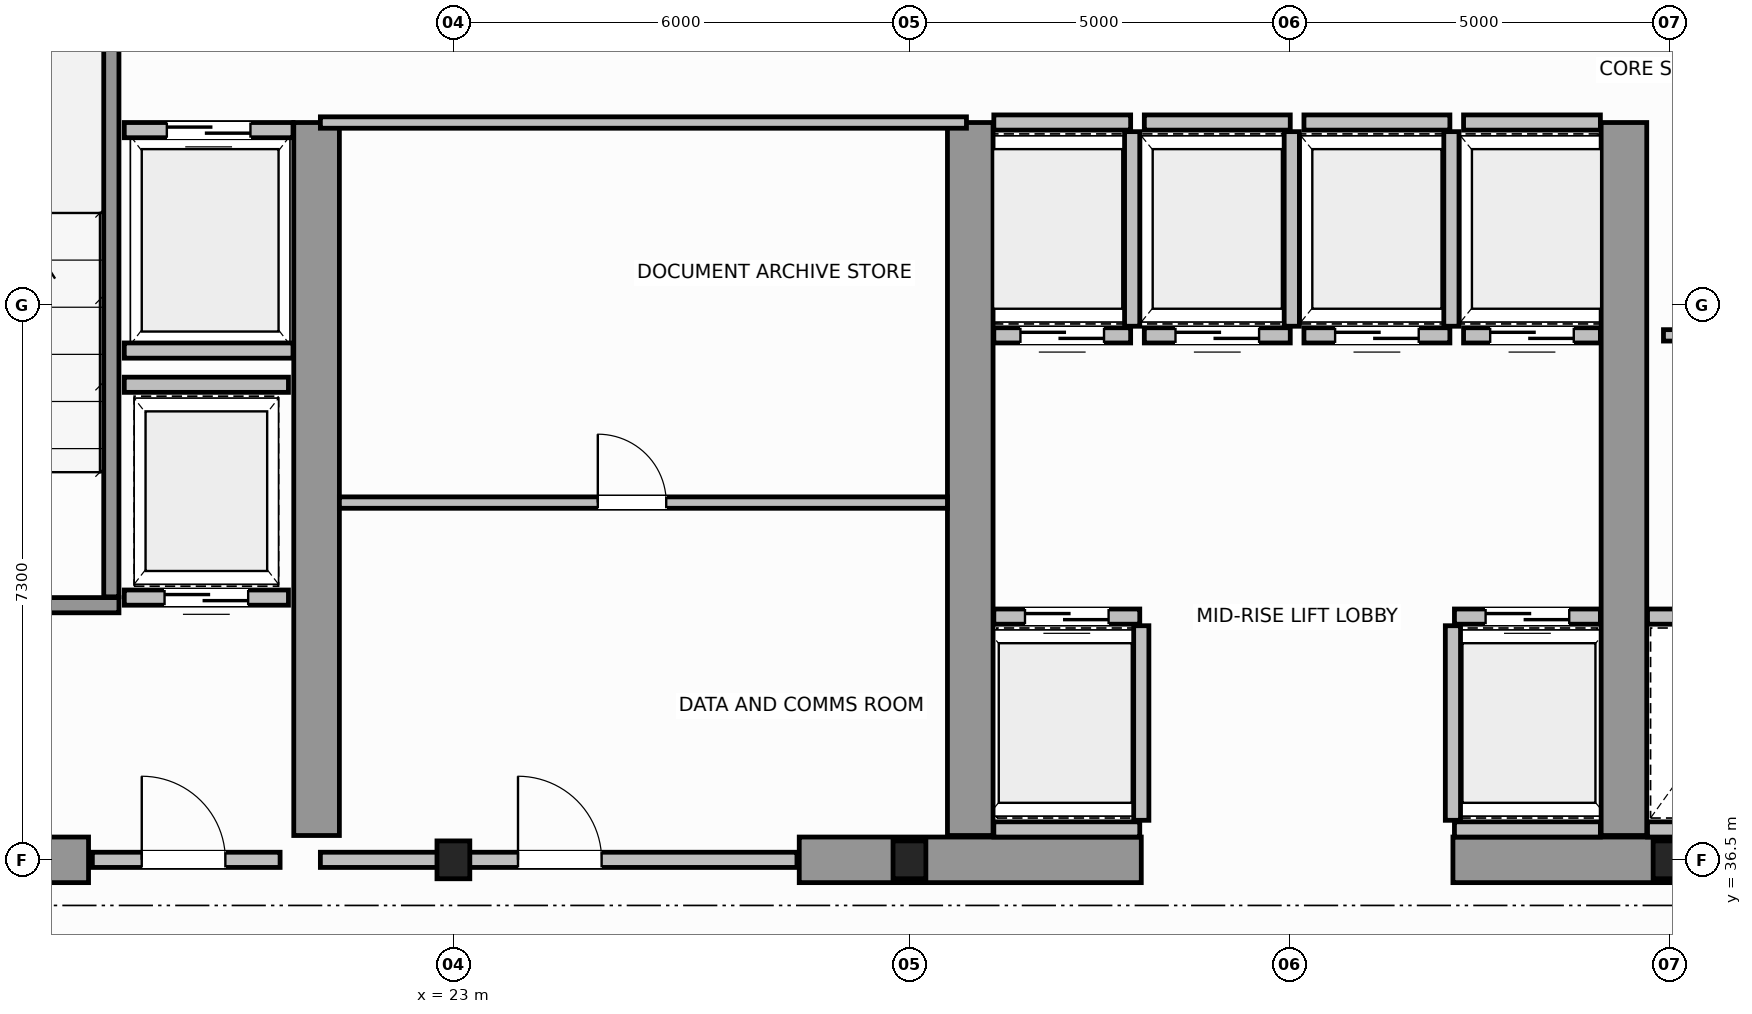
"""IFC4 building model, lengths in metres.
Left out: names, types, materials, properties, quantities, classifications, styles, units other than length and angle.
Written with IfcOpenShell. Run it as: python <this file> out.ifc"""

import sys

from ifc_helpers import new_model, si_unit, direction, frame, frame_2d, origin, origin_2d, place, context, subcontext, project, spatial, rectangle, i_section, extrude, source, transform, mapped, element, fill, save


model = new_model("IFC4")
c1 = context("Model", 3, precision=1e-05, world=origin(), true_north=direction((0.0, 1.0)))
c2 = subcontext(c1, "Body", "Model", "MODEL_VIEW")
j1 = project(units=[si_unit("LENGTHUNIT", "METRE"), si_unit("PLANEANGLEUNIT", "RADIAN")], contexts=[c1])
p1 = place(None, origin())
s1 = spatial("IfcSite", under=j1, at=p1, CompositionType="ELEMENT")
p2 = place(p1, origin())
s2 = spatial("IfcBuilding", under=s1, at=p2, CompositionType="ELEMENT")
p3 = place(p2, frame((0.0, 0.0, 176.6)))
s3 = spatial("IfcBuildingStorey", under=s2, at=p3, CompositionType="ELEMENT", Elevation=176.6)
m1 = source(origin(), c2, "Body", "SweptSolid", [
    extrude(i_section(OverallWidth=0.432, OverallDepth=0.498, WebThickness=0.055, FlangeThickness=0.068, FilletRadius=0.015, at=origin_2d()), origin(), (0.0, 0.0, 1.0), 3.8),
])
for number, where, z_axis, x_axis in (
    (1, (23.0, 36.5, 0.0), (0.0, 0.0, 1.0), (1.0, 0.0, 0.0)),
    (2, (29.0, 36.5, 0.0), (0.0, 0.0, 1.0), (1.0, 0.0, 0.0)),
    (3, (39.0, 36.5, 0.0), (0.0, 0.0, 1.0), (1.0, 0.0, 0.0)),
):
    element("IfcColumn", number, at=place(p3, frame(where, z_axis=z_axis, x_axis=x_axis)), inside=s3, PredefinedType="COLUMN", context=c2, shape_type="MappedRepresentation", body=[
        mapped(m1, transform((0.0, 0.0, 0.0), scale=1.0)),
    ])
p4 = place(p3, frame((14.32, 36.5, 0.0), z_axis=(0.0, 0.0, 1.0), x_axis=(1.0, 0.0, 0.0)))
e4 = element("IfcWall", 4, at=p4, inside=s3, PredefinedType="SHEAR", context=c2, shape_type="SweptSolid", body=[
    extrude(rectangle(XDim=3.88, YDim=0.6, at=frame_2d((1.94, 0.0))), origin(), (0.0, 0.0, 1.0), 2.58),
])
for number, where, z_axis, x_axis in (
    (5, (27.55, 36.5, 0.0), (0.0, 0.0, 1.0), (1.0, 0.0, 0.0)),
    (6, (36.15, 36.5, 0.0), (0.0, 0.0, 1.0), (1.0, 0.0, 0.0)),
):
    element("IfcWall", number, at=place(p3, frame(where, z_axis=z_axis, x_axis=x_axis)), inside=s3, PredefinedType="SHEAR", context=c2, shape_type="SweptSolid", body=[
        extrude(rectangle(XDim=4.5, YDim=0.6, at=frame_2d((2.25, 0.0))), origin(), (0.0, 0.0, 1.0), 3.8),
    ])
for number, where, z_axis, x_axis in (
    (7, (21.2, 36.82, 0.0), (0.0, 0.0, 1.0), (0.0, 1.0, 0.0)),
    (8, (29.8, 36.82, 0.0), (0.0, 0.0, 1.0), (0.0, 1.0, 0.0)),
    (9, (38.4, 36.82, 0.0), (0.0, 0.0, 1.0), (0.0, 1.0, 0.0)),
):
    element("IfcWall", number, at=place(p3, frame(where, z_axis=z_axis, x_axis=x_axis)), inside=s3, PredefinedType="SHEAR", context=c2, shape_type="SweptSolid", body=[
        extrude(rectangle(XDim=9.38, YDim=0.6, at=frame_2d((4.69, 0.0))), origin(), (0.0, 0.0, 1.0), 3.8),
    ])
p5 = place(p3, frame((14.3, 39.85, 0.0), z_axis=(0.0, 0.0, 1.0), x_axis=(1.0, 0.0, 0.0)))
e10 = element("IfcWall", 10, at=p5, inside=s3, PredefinedType="SOLIDWALL", context=c2, shape_type="SweptSolid", body=[
    extrude(rectangle(XDim=4.3, YDim=0.2, at=frame_2d((2.15, 0.0))), origin(), (0.0, 0.0, 1.0), 3.8),
])
p6 = place(p5, frame((1.875, 0.0, 0.0)))
e11 = element("IfcOpeningElement", 11, at=p6, cuts=e10, PredefinedType="OPENING", context=c2, shape_type="SweptSolid", body=[
    extrude(rectangle(XDim=1.1, YDim=2.15, at=frame_2d((0.55, 1.075))), frame((0.0, 0.11, 0.0), z_axis=(0.0, -1.0, 0.0), x_axis=(1.0, 0.0, 0.0)), (0.0, 0.0, 1.0), 0.22),
])
p7 = place(p3, frame((18.5, 39.96, 0.0), z_axis=(0.0, 0.0, 1.0), x_axis=(0.0, 1.0, 0.0)))
e12 = element("IfcWall", 12, at=p7, inside=s3, PredefinedType="SOLIDWALL", context=c2, shape_type="SweptSolid", body=[
    extrude(rectangle(XDim=9.93, YDim=0.2, at=frame_2d((4.965, 0.0))), origin(), (0.0, 0.0, 1.0), 3.8),
])
p8 = place(p3, frame((18.25, 36.5, 0.0), z_axis=(0.0, 0.0, 1.0), x_axis=(1.0, 0.0, 0.0)))
e13 = element("IfcWall", 13, at=p8, inside=s3, PredefinedType="SOLIDWALL", context=c2, shape_type="SweptSolid", body=[
    extrude(rectangle(XDim=2.47, YDim=0.2, at=frame_2d((1.235, 0.0))), origin(), (0.0, 0.0, 1.0), 2.57),
])
p9 = place(p8, frame((0.65, 0.0, 0.0)))
e14 = element("IfcOpeningElement", 14, at=p9, cuts=e13, PredefinedType="OPENING", context=c2, shape_type="SweptSolid", body=[
    extrude(rectangle(XDim=1.1, YDim=2.15, at=frame_2d((0.55, 1.075))), frame((0.0, 0.11, 0.0), z_axis=(0.0, -1.0, 0.0), x_axis=(1.0, 0.0, 0.0)), (0.0, 0.0, 1.0), 0.22),
])
p10 = place(p3, frame((30.11, 39.7, 0.0), z_axis=(0.0, 0.0, 1.0), x_axis=(1.0, 0.0, 0.0)))
e15 = element("IfcWall", 15, at=p10, inside=s3, PredefinedType="SOLIDWALL", context=c2, shape_type="SweptSolid", body=[
    extrude(rectangle(XDim=1.92, YDim=0.2, at=frame_2d((0.96, 0.0))), origin(), (0.0, 0.0, 1.0), 3.58),
])
p11 = place(p10, frame((0.41, 0.0, 0.0)))
e16 = element("IfcOpeningElement", 16, at=p11, cuts=e15, PredefinedType="OPENING", context=c2, shape_type="SweptSolid", body=[
    extrude(rectangle(XDim=1.1, YDim=2.15, at=frame_2d((0.55, 1.075))), frame((0.0, 0.11, 0.0), z_axis=(0.0, -1.0, 0.0), x_axis=(1.0, 0.0, 0.0)), (0.0, 0.0, 1.0), 0.22),
])
p12 = place(p3, frame((30.11, 36.9, 0.0), z_axis=(0.0, 0.0, 1.0), x_axis=(1.0, 0.0, 0.0)))
e17 = element("IfcWall", 17, at=p12, inside=s3, PredefinedType="SOLIDWALL", context=c2, shape_type="SweptSolid", body=[
    extrude(rectangle(XDim=1.92, YDim=0.2, at=frame_2d((0.96, 0.0))), origin(), (0.0, 0.0, 1.0), 2.37),
])
p13 = place(p3, frame((32.05, 37.02, 0.0), z_axis=(0.0, 0.0, 1.0), x_axis=(0.0, 1.0, 0.0)))
e18 = element("IfcWall", 18, at=p13, inside=s3, PredefinedType="SOLIDWALL", context=c2, shape_type="SweptSolid", body=[
    extrude(rectangle(XDim=2.56, YDim=0.2, at=frame_2d((1.28, 0.0))), origin(), (0.0, 0.0, 1.0), 3.58),
])
p14 = place(p3, frame((36.17, 39.7, 0.0), z_axis=(0.0, 0.0, 1.0), x_axis=(1.0, 0.0, 0.0)))
e19 = element("IfcWall", 19, at=p14, inside=s3, PredefinedType="SOLIDWALL", context=c2, shape_type="SweptSolid", body=[
    extrude(rectangle(XDim=1.92, YDim=0.2, at=frame_2d((0.96, 0.0))), origin(), (0.0, 0.0, 1.0), 3.58),
])
p15 = place(p14, frame((0.41, 0.0, 0.0)))
e20 = element("IfcOpeningElement", 20, at=p15, cuts=e19, PredefinedType="OPENING", context=c2, shape_type="SweptSolid", body=[
    extrude(rectangle(XDim=1.1, YDim=2.15, at=frame_2d((0.55, 1.075))), frame((0.0, 0.11, 0.0), z_axis=(0.0, -1.0, 0.0), x_axis=(1.0, 0.0, 0.0)), (0.0, 0.0, 1.0), 0.22),
])
p16 = place(p3, frame((36.17, 36.9, 0.0), z_axis=(0.0, 0.0, 1.0), x_axis=(1.0, 0.0, 0.0)))
e21 = element("IfcWall", 21, at=p16, inside=s3, PredefinedType="SOLIDWALL", context=c2, shape_type="SweptSolid", body=[
    extrude(rectangle(XDim=1.92, YDim=0.2, at=frame_2d((0.96, 0.0))), origin(), (0.0, 0.0, 1.0), 2.37),
])
p17 = place(p3, frame((36.15, 37.02, 0.0), z_axis=(0.0, 0.0, 1.0), x_axis=(0.0, 1.0, 0.0)))
e22 = element("IfcWall", 22, at=p17, inside=s3, PredefinedType="SOLIDWALL", context=c2, shape_type="SweptSolid", body=[
    extrude(rectangle(XDim=2.56, YDim=0.2, at=frame_2d((1.28, 0.0))), origin(), (0.0, 0.0, 1.0), 3.58),
])
p18 = place(p3, frame((30.11, 43.4, 0.0), z_axis=(0.0, 0.0, 1.0), x_axis=(1.0, 0.0, 0.0)))
e23 = element("IfcWall", 23, at=p18, inside=s3, PredefinedType="SOLIDWALL", context=c2, shape_type="SweptSolid", body=[
    extrude(rectangle(XDim=1.8, YDim=0.2, at=frame_2d((0.9, 0.0))), origin(), (0.0, 0.0, 1.0), 3.58),
])
p19 = place(p18, frame((0.35, 0.0, 0.0)))
e24 = element("IfcOpeningElement", 24, at=p19, cuts=e23, PredefinedType="OPENING", context=c2, shape_type="SweptSolid", body=[
    extrude(rectangle(XDim=1.1, YDim=2.15, at=frame_2d((0.55, 1.075))), frame((0.0, 0.11, 0.0), z_axis=(0.0, -1.0, 0.0), x_axis=(1.0, 0.0, 0.0)), (0.0, 0.0, 1.0), 0.22),
])
p20 = place(p3, frame((30.11, 46.2, 0.0), z_axis=(0.0, 0.0, 1.0), x_axis=(1.0, 0.0, 0.0)))
e25 = element("IfcWall", 25, at=p20, inside=s3, PredefinedType="SOLIDWALL", context=c2, shape_type="SweptSolid", body=[
    extrude(rectangle(XDim=1.8, YDim=0.2, at=frame_2d((0.9, 0.0))), origin(), (0.0, 0.0, 1.0), 3.58),
])
p21 = place(p3, frame((31.93, 43.52, 0.0), z_axis=(0.0, 0.0, 1.0), x_axis=(0.0, 1.0, 0.0)))
e26 = element("IfcWall", 26, at=p21, inside=s3, PredefinedType="SOLIDWALL", context=c2, shape_type="SweptSolid", body=[
    extrude(rectangle(XDim=2.56, YDim=0.2, at=frame_2d((1.28, 0.0))), origin(), (0.0, 0.0, 1.0), 3.58),
])
p22 = place(p3, frame((32.09, 43.4, 0.0), z_axis=(0.0, 0.0, 1.0), x_axis=(1.0, 0.0, 0.0)))
e27 = element("IfcWall", 27, at=p22, inside=s3, PredefinedType="SOLIDWALL", context=c2, shape_type="SweptSolid", body=[
    extrude(rectangle(XDim=1.92, YDim=0.2, at=frame_2d((0.96, 0.0))), origin(), (0.0, 0.0, 1.0), 3.58),
])
p23 = place(p22, frame((0.41, 0.0, 0.0)))
e28 = element("IfcOpeningElement", 28, at=p23, cuts=e27, PredefinedType="OPENING", context=c2, shape_type="SweptSolid", body=[
    extrude(rectangle(XDim=1.1, YDim=2.15, at=frame_2d((0.55, 1.075))), frame((0.0, 0.11, 0.0), z_axis=(0.0, -1.0, 0.0), x_axis=(1.0, 0.0, 0.0)), (0.0, 0.0, 1.0), 0.22),
])
p24 = place(p3, frame((32.09, 46.2, 0.0), z_axis=(0.0, 0.0, 1.0), x_axis=(1.0, 0.0, 0.0)))
e29 = element("IfcWall", 29, at=p24, inside=s3, PredefinedType="SOLIDWALL", context=c2, shape_type="SweptSolid", body=[
    extrude(rectangle(XDim=1.92, YDim=0.2, at=frame_2d((0.96, 0.0))), origin(), (0.0, 0.0, 1.0), 3.58),
])
p25 = place(p3, frame((34.03, 43.52, 0.0), z_axis=(0.0, 0.0, 1.0), x_axis=(0.0, 1.0, 0.0)))
e30 = element("IfcWall", 30, at=p25, inside=s3, PredefinedType="SOLIDWALL", context=c2, shape_type="SweptSolid", body=[
    extrude(rectangle(XDim=2.56, YDim=0.2, at=frame_2d((1.28, 0.0))), origin(), (0.0, 0.0, 1.0), 3.58),
])
p26 = place(p3, frame((34.19, 43.4, 0.0), z_axis=(0.0, 0.0, 1.0), x_axis=(1.0, 0.0, 0.0)))
e31 = element("IfcWall", 31, at=p26, inside=s3, PredefinedType="SOLIDWALL", context=c2, shape_type="SweptSolid", body=[
    extrude(rectangle(XDim=1.92, YDim=0.2, at=frame_2d((0.96, 0.0))), origin(), (0.0, 0.0, 1.0), 3.58),
])
p27 = place(p26, frame((0.41, 0.0, 0.0)))
e32 = element("IfcOpeningElement", 32, at=p27, cuts=e31, PredefinedType="OPENING", context=c2, shape_type="SweptSolid", body=[
    extrude(rectangle(XDim=1.1, YDim=2.15, at=frame_2d((0.55, 1.075))), frame((0.0, 0.11, 0.0), z_axis=(0.0, -1.0, 0.0), x_axis=(1.0, 0.0, 0.0)), (0.0, 0.0, 1.0), 0.22),
])
p28 = place(p3, frame((34.19, 46.2, 0.0), z_axis=(0.0, 0.0, 1.0), x_axis=(1.0, 0.0, 0.0)))
e33 = element("IfcWall", 33, at=p28, inside=s3, PredefinedType="SOLIDWALL", context=c2, shape_type="SweptSolid", body=[
    extrude(rectangle(XDim=1.92, YDim=0.2, at=frame_2d((0.96, 0.0))), origin(), (0.0, 0.0, 1.0), 3.58),
])
p29 = place(p3, frame((36.13, 43.52, 0.0), z_axis=(0.0, 0.0, 1.0), x_axis=(0.0, 1.0, 0.0)))
e34 = element("IfcWall", 34, at=p29, inside=s3, PredefinedType="SOLIDWALL", context=c2, shape_type="SweptSolid", body=[
    extrude(rectangle(XDim=2.56, YDim=0.2, at=frame_2d((1.28, 0.0))), origin(), (0.0, 0.0, 1.0), 3.58),
])
p30 = place(p3, frame((36.29, 43.4, 0.0), z_axis=(0.0, 0.0, 1.0), x_axis=(1.0, 0.0, 0.0)))
e35 = element("IfcWall", 35, at=p30, inside=s3, PredefinedType="SOLIDWALL", context=c2, shape_type="SweptSolid", body=[
    extrude(rectangle(XDim=1.8, YDim=0.2, at=frame_2d((0.9, 0.0))), origin(), (0.0, 0.0, 1.0), 3.58),
])
p31 = place(p30, frame((0.35, 0.0, 0.0)))
e36 = element("IfcOpeningElement", 36, at=p31, cuts=e35, PredefinedType="OPENING", context=c2, shape_type="SweptSolid", body=[
    extrude(rectangle(XDim=1.1, YDim=2.15, at=frame_2d((0.55, 1.075))), frame((0.0, 0.11, 0.0), z_axis=(0.0, -1.0, 0.0), x_axis=(1.0, 0.0, 0.0)), (0.0, 0.0, 1.0), 0.22),
])
p32 = place(p3, frame((36.29, 46.2, 0.0), z_axis=(0.0, 0.0, 1.0), x_axis=(1.0, 0.0, 0.0)))
e37 = element("IfcWall", 37, at=p32, inside=s3, PredefinedType="SOLIDWALL", context=c2, shape_type="SweptSolid", body=[
    extrude(rectangle(XDim=1.8, YDim=0.2, at=frame_2d((0.9, 0.0))), origin(), (0.0, 0.0, 1.0), 3.58),
])
p33 = place(p3, frame((38.71, 39.7, 0.0), z_axis=(0.0, 0.0, 1.0), x_axis=(1.0, 0.0, 0.0)))
e38 = element("IfcWall", 38, at=p33, inside=s3, PredefinedType="SOLIDWALL", context=c2, shape_type="SweptSolid", body=[
    extrude(rectangle(XDim=1.92, YDim=0.2, at=frame_2d((0.96, 0.0))), origin(), (0.0, 0.0, 1.0), 3.58),
])
p34 = place(p3, frame((38.71, 36.9, 0.0), z_axis=(0.0, 0.0, 1.0), x_axis=(1.0, 0.0, 0.0)))
e39 = element("IfcWall", 39, at=p34, inside=s3, PredefinedType="SOLIDWALL", context=c2, shape_type="SweptSolid", body=[
    extrude(rectangle(XDim=1.92, YDim=0.2, at=frame_2d((0.96, 0.0))), origin(), (0.0, 0.0, 1.0), 2.37),
])
p35 = place(p3, frame((18.67, 46.1, 0.0), z_axis=(0.0, 0.0, 1.0), x_axis=(1.0, 0.0, 0.0)))
e40 = element("IfcWall", 40, at=p35, inside=s3, PredefinedType="SOLIDWALL", context=c2, shape_type="SweptSolid", body=[
    extrude(rectangle(XDim=2.22, YDim=0.2, at=frame_2d((1.11, 0.0))), origin(), (0.0, 0.0, 1.0), 3.58),
])
p36 = place(p35, frame((0.56, 0.0, 0.0)))
e41 = element("IfcOpeningElement", 41, at=p36, cuts=e40, PredefinedType="OPENING", context=c2, shape_type="SweptSolid", body=[
    extrude(rectangle(XDim=1.1, YDim=2.15, at=frame_2d((0.55, 1.075))), frame((0.0, 0.11, 0.0), z_axis=(0.0, -1.0, 0.0), x_axis=(1.0, 0.0, 0.0)), (0.0, 0.0, 1.0), 0.22),
])
p37 = place(p3, frame((18.67, 43.2, 0.0), z_axis=(0.0, 0.0, 1.0), x_axis=(1.0, 0.0, 0.0)))
e42 = element("IfcWall", 42, at=p37, inside=s3, PredefinedType="SOLIDWALL", context=c2, shape_type="SweptSolid", body=[
    extrude(rectangle(XDim=2.22, YDim=0.2, at=frame_2d((1.11, 0.0))), origin(), (0.0, 0.0, 1.0), 3.58),
])
p38 = place(p3, frame((18.67, 39.95, 0.0), z_axis=(0.0, 0.0, 1.0), x_axis=(1.0, 0.0, 0.0)))
e43 = element("IfcWall", 43, at=p38, inside=s3, PredefinedType="SOLIDWALL", context=c2, shape_type="SweptSolid", body=[
    extrude(rectangle(XDim=2.16, YDim=0.2, at=frame_2d((1.08, 0.0))), origin(), (0.0, 0.0, 1.0), 3.58),
])
p39 = place(p38, frame((0.53, 0.0, 0.0)))
e44 = element("IfcOpeningElement", 44, at=p39, cuts=e43, PredefinedType="OPENING", context=c2, shape_type="SweptSolid", body=[
    extrude(rectangle(XDim=1.1, YDim=2.15, at=frame_2d((0.55, 1.075))), frame((0.0, 0.11, 0.0), z_axis=(0.0, -1.0, 0.0), x_axis=(1.0, 0.0, 0.0)), (0.0, 0.0, 1.0), 0.22),
])
p40 = place(p3, frame((18.67, 42.75, 0.0), z_axis=(0.0, 0.0, 1.0), x_axis=(1.0, 0.0, 0.0)))
e45 = element("IfcWall", 45, at=p40, inside=s3, PredefinedType="SOLIDWALL", context=c2, shape_type="SweptSolid", body=[
    extrude(rectangle(XDim=2.16, YDim=0.2, at=frame_2d((1.08, 0.0))), origin(), (0.0, 0.0, 1.0), 3.58),
])
p41 = place(p3, frame((21.25, 36.5, 0.0), z_axis=(0.0, 0.0, 1.0), x_axis=(1.0, 0.0, 0.0)))
e46 = element("IfcWall", 46, at=p41, inside=s3, PredefinedType="SOLIDWALL", context=c2, shape_type="SweptSolid", body=[
    extrude(rectangle(XDim=6.27, YDim=0.2, at=frame_2d((3.135, 0.0))), origin(), (0.0, 0.0, 1.0), 2.37),
])
p42 = place(p41, frame((2.6, 0.0, 0.0)))
e47 = element("IfcOpeningElement", 47, at=p42, cuts=e46, PredefinedType="OPENING", context=c2, shape_type="SweptSolid", body=[
    extrude(rectangle(XDim=1.1, YDim=2.15, at=frame_2d((0.55, 1.075))), frame((0.0, 0.11, 0.0), z_axis=(0.0, -1.0, 0.0), x_axis=(1.0, 0.0, 0.0)), (0.0, 0.0, 1.0), 0.22),
])
p43 = place(p3, frame((21.25, 46.2, 0.0), z_axis=(0.0, 0.0, 1.0), x_axis=(1.0, 0.0, 0.0)))
e48 = element("IfcWall", 48, at=p43, inside=s3, PredefinedType="PARTITIONING", context=c2, shape_type="SweptSolid", body=[
    extrude(rectangle(XDim=8.5, YDim=0.15, at=frame_2d((4.25, 0.0))), origin(), (0.0, 0.0, 1.0), 3.58),
])
p44 = place(p3, frame((21.5, 41.2, 0.0), z_axis=(0.0, 0.0, 1.0), x_axis=(1.0, 0.0, 0.0)))
e49 = element("IfcWall", 49, at=p44, inside=s3, PredefinedType="PARTITIONING", context=c2, shape_type="SweptSolid", body=[
    extrude(rectangle(XDim=8.0, YDim=0.15, at=frame_2d((4.0, 0.0))), origin(), (0.0, 0.0, 1.0), 3.58),
])
p45 = place(p44, frame((3.4, 0.0, 0.0)))
e50 = element("IfcOpeningElement", 50, at=p45, cuts=e49, PredefinedType="OPENING", context=c2, shape_type="SweptSolid", body=[
    extrude(rectangle(XDim=0.9, YDim=2.1, at=frame_2d((0.45, 1.05))), frame((0.0, 0.085, 0.0), z_axis=(0.0, -1.0, 0.0), x_axis=(1.0, 0.0, 0.0)), (0.0, 0.0, 1.0), 0.17),
])
p46 = place(p3, frame((38.92, 43.4, 0.0), z_axis=(0.0, 0.0, 1.0), x_axis=(1.0, 0.0, 0.0)))
e51 = element("IfcWall", 51, at=p46, inside=s3, PredefinedType="PARTITIONING", context=c2, shape_type="SweptSolid", body=[
    extrude(rectangle(XDim=1.6, YDim=0.15, at=frame_2d((0.8, 0.0))), origin(), (0.0, 0.0, 1.0), 3.58),
])
p47 = place(p46, frame((0.35, 0.0, 0.0)))
e52 = element("IfcOpeningElement", 52, at=p47, cuts=e51, PredefinedType="OPENING", context=c2, shape_type="SweptSolid", body=[
    extrude(rectangle(XDim=0.9, YDim=2.1, at=frame_2d((0.45, 1.05))), frame((0.0, 0.085, 0.0), z_axis=(0.0, -1.0, 0.0), x_axis=(1.0, 0.0, 0.0)), (0.0, 0.0, 1.0), 0.17),
])
m2 = source(origin(), c2, "Body", "SweptSolid", [
    extrude(rectangle(XDim=1.1, YDim=2.15, at=frame_2d((0.55, 1.075))), frame((0.0, 0.025, 0.0), z_axis=(0.0, -1.0, 0.0), x_axis=(1.0, 0.0, 0.0)), (0.0, 0.0, 1.0), 0.05),
])
p48 = place(p9, origin())
e53 = element("IfcDoor", 53, at=p48, inside=s3, OperationType="SINGLE_SWING_RIGHT", PredefinedType="DOOR", context=c2, shape_type="MappedRepresentation", body=[
    mapped(m2, transform((0.0, 0.0, 0.0), scale=1.0)),
])
fill(e14, e53)
p49 = place(p11, origin())
e54 = element("IfcDoor", 54, at=p49, inside=s3, OperationType="DOUBLE_DOOR_SLIDING", PredefinedType="DOOR", context=c2, shape_type="MappedRepresentation", body=[
    mapped(m2, transform((0.0, 0.0, 0.0), scale=1.0)),
])
fill(e16, e54)
p50 = place(p15, origin())
e55 = element("IfcDoor", 55, at=p50, inside=s3, OperationType="DOUBLE_DOOR_SLIDING", PredefinedType="DOOR", context=c2, shape_type="MappedRepresentation", body=[
    mapped(m2, transform((0.0, 0.0, 0.0), scale=1.0)),
])
fill(e20, e55)
p51 = place(p19, origin())
e56 = element("IfcDoor", 56, at=p51, inside=s3, OperationType="DOUBLE_DOOR_SLIDING", PredefinedType="DOOR", context=c2, shape_type="MappedRepresentation", body=[
    mapped(m2, transform((0.0, 0.0, 0.0), scale=1.0)),
])
fill(e24, e56)
p52 = place(p23, origin())
e57 = element("IfcDoor", 57, at=p52, inside=s3, OperationType="DOUBLE_DOOR_SLIDING", PredefinedType="DOOR", context=c2, shape_type="MappedRepresentation", body=[
    mapped(m2, transform((0.0, 0.0, 0.0), scale=1.0)),
])
fill(e28, e57)
p53 = place(p27, origin())
e58 = element("IfcDoor", 58, at=p53, inside=s3, OperationType="DOUBLE_DOOR_SLIDING", PredefinedType="DOOR", context=c2, shape_type="MappedRepresentation", body=[
    mapped(m2, transform((0.0, 0.0, 0.0), scale=1.0)),
])
fill(e32, e58)
p54 = place(p31, origin())
e59 = element("IfcDoor", 59, at=p54, inside=s3, OperationType="DOUBLE_DOOR_SLIDING", PredefinedType="DOOR", context=c2, shape_type="MappedRepresentation", body=[
    mapped(m2, transform((0.0, 0.0, 0.0), scale=1.0)),
])
fill(e36, e59)
p55 = place(p36, origin())
e60 = element("IfcDoor", 60, at=p55, inside=s3, OperationType="DOUBLE_DOOR_SLIDING", PredefinedType="DOOR", context=c2, shape_type="MappedRepresentation", body=[
    mapped(m2, transform((0.0, 0.0, 0.0), scale=1.0)),
])
fill(e41, e60)
p56 = place(p39, origin())
e61 = element("IfcDoor", 61, at=p56, inside=s3, OperationType="DOUBLE_DOOR_SLIDING", PredefinedType="DOOR", context=c2, shape_type="MappedRepresentation", body=[
    mapped(m2, transform((0.0, 0.0, 0.0), scale=1.0)),
])
fill(e44, e61)
p57 = place(p42, origin())
e62 = element("IfcDoor", 62, at=p57, inside=s3, OperationType="SINGLE_SWING_LEFT", PredefinedType="DOOR", context=c2, shape_type="MappedRepresentation", body=[
    mapped(m2, transform((0.0, 0.0, 0.0), scale=1.0)),
])
fill(e47, e62)
m3 = source(origin(), c2, "Body", "SweptSolid", [
    extrude(rectangle(XDim=0.9, YDim=2.1, at=frame_2d((0.45, 1.05))), frame((0.0, 0.025, 0.0), z_axis=(0.0, -1.0, 0.0), x_axis=(1.0, 0.0, 0.0)), (0.0, 0.0, 1.0), 0.05),
])
p58 = place(p45, origin())
e63 = element("IfcDoor", 63, at=p58, inside=s3, OperationType="SINGLE_SWING_RIGHT", PredefinedType="DOOR", context=c2, shape_type="MappedRepresentation", body=[
    mapped(m3, transform((0.0, 0.0, 0.0), scale=1.0)),
])
fill(e50, e63)
save(model, sys.argv[1])
